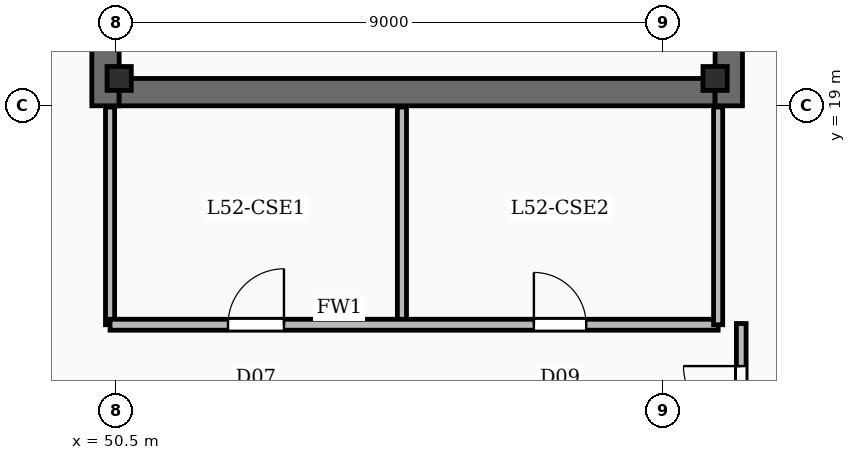
"""IFC4 building model, lengths in metres.
Left out: names, types, materials, properties, quantities, classifications, styles, units other than length and angle.
Written with IfcOpenShell. Run it as: python <this file> out.ifc"""

import sys

from ifc_helpers import new_model, si_unit, direction, frame, frame_2d, origin, origin_2d, place, context, subcontext, project, spatial, rectangle, i_section, extrude, element, fill, save


model = new_model("IFC4")
c1 = context("Model", 3, precision=1e-05, world=origin(), true_north=direction((0.0, 1.0)))
c2 = subcontext(c1, "Body", "Model", "MODEL_VIEW")
j1 = project(units=[si_unit("LENGTHUNIT", "METRE"), si_unit("PLANEANGLEUNIT", "RADIAN")], contexts=[c1])
p1 = place(None, origin())
s1 = spatial("IfcSite", under=j1, at=p1, CompositionType="ELEMENT")
p2 = place(p1, origin())
s2 = spatial("IfcBuilding", under=s1, at=p2, CompositionType="ELEMENT")
p3 = place(p2, frame((0.0, 0.0, 216.15)))
s3 = spatial("IfcBuildingStorey", under=s2, at=p3, CompositionType="ELEMENT", Elevation=216.15)
p4 = place(p3, frame((50.325, 19.0, -0.45), z_axis=(0.0, 0.0, 1.0), x_axis=(0.0, 1.0, 0.0)))
e1 = element("IfcWall", 1, at=p4, inside=s3, PredefinedType="SHEAR", context=c2, shape_type="SweptSolid", body=[
    extrude(rectangle(XDim=20.8, YDim=0.45, at=frame_2d((10.4, 0.0))), origin(), (0.0, 0.0, 1.0), 4.98),
])
p5 = place(p4, frame((2.5, 0.0, 0.45)))
e2 = element("IfcOpeningElement", 2, at=p5, cuts=e1, PredefinedType="OPENING", context=c2, shape_type="SweptSolid", body=[
    extrude(rectangle(XDim=1.05, YDim=2.15, at=frame_2d((0.525, 1.075))), frame((0.0, 0.235, 0.0), z_axis=(0.0, -1.0, 0.0), x_axis=(1.0, 0.0, 0.0)), (0.0, 0.0, 1.0), 0.47),
])
p6 = place(p4, frame((8.65, 0.0, 0.45)))
e3 = element("IfcOpeningElement", 3, at=p6, cuts=e1, PredefinedType="OPENING", context=c2, shape_type="SweptSolid", body=[
    extrude(rectangle(XDim=1.05, YDim=2.15, at=frame_2d((0.525, 1.075))), frame((0.0, 0.235, 0.0), z_axis=(0.0, -1.0, 0.0), x_axis=(1.0, 0.0, 0.0)), (0.0, 0.0, 1.0), 0.47),
])
p7 = place(p4, frame((14.62, 0.0, 0.45)))
e4 = element("IfcOpeningElement", 4, at=p7, cuts=e1, PredefinedType="OPENING", context=c2, shape_type="SweptSolid", body=[
    extrude(rectangle(XDim=1.1, YDim=2.15, at=frame_2d((0.55, 1.075))), frame((0.0, 0.235, 0.0), z_axis=(0.0, -1.0, 0.0), x_axis=(1.0, 0.0, 0.0)), (0.0, 0.0, 1.0), 0.47),
])
p8 = place(p3, frame((60.575, 19.0, -0.45), z_axis=(0.0, 0.0, 1.0), x_axis=(0.0, 1.0, 0.0)))
e5 = element("IfcWall", 5, at=p8, inside=s3, PredefinedType="SHEAR", context=c2, shape_type="SweptSolid", body=[
    extrude(rectangle(XDim=20.8, YDim=0.45, at=frame_2d((10.4, 0.0))), origin(), (0.0, 0.0, 1.0), 4.98),
])
p9 = place(p3, frame((50.55, 19.225, -0.45), z_axis=(0.0, 0.0, 1.0), x_axis=(1.0, 0.0, 0.0)))
e6 = element("IfcWall", 6, at=p9, inside=s3, PredefinedType="SHEAR", context=c2, shape_type="SweptSolid", body=[
    extrude(rectangle(XDim=9.8, YDim=0.45, at=frame_2d((4.9, 0.0))), origin(), (0.0, 0.0, 1.0), 4.98),
])
for number, where, z_axis, x_axis in (
    (7, (50.55, 19.45, -0.45), (0.0, 0.0, 1.0), (1.0, 0.0, 0.0)),
    (8, (60.35, 19.45, -0.45), (0.0, 0.0, 1.0), (1.0, 0.0, 0.0)),
):
    element("IfcColumn", number, at=place(p3, frame(where, z_axis=z_axis, x_axis=x_axis)), inside=s3, PredefinedType="COLUMN", context=c2, shape_type="SweptSolid", body=[
        extrude(i_section(OverallWidth=0.399, OverallDepth=0.393, WebThickness=0.023, FlangeThickness=0.037, FilletRadius=0.02, at=origin_2d()), origin(), (0.0, 0.0, 1.0), 4.98),
    ])
p10 = place(p3, frame((55.2, 15.4, 0.0), z_axis=(0.0, 0.0, 1.0), x_axis=(0.0, 1.0, 0.0)))
e9 = element("IfcWall", 9, at=p10, inside=s3, PredefinedType="PARTITIONING", context=c2, shape_type="SweptSolid", body=[
    extrude(rectangle(XDim=3.58, YDim=0.15, at=frame_2d((1.79, 0.0))), origin(), (0.0, 0.0, 1.0), 3.59),
])
p11 = place(p3, frame((50.4, 15.4, 0.0), z_axis=(0.0, 0.0, 1.0), x_axis=(1.0, 0.0, 0.0)))
e10 = element("IfcWall", 10, at=p11, inside=s3, PredefinedType="SOLIDWALL", context=c2, shape_type="SweptSolid", body=[
    extrude(rectangle(XDim=10.0, YDim=0.18, at=frame_2d((5.0, 0.0))), origin(), (0.0, 0.0, 1.0), 3.59),
])
p12 = place(p11, frame((1.94, 0.0, 0.0)))
e11 = element("IfcOpeningElement", 11, at=p12, cuts=e10, PredefinedType="OPENING", context=c2, shape_type="SweptSolid", body=[
    extrude(rectangle(XDim=0.92, YDim=2.1, at=frame_2d((0.46, 1.05))), frame((0.0, 0.1, 0.0), z_axis=(0.0, -1.0, 0.0), x_axis=(1.0, 0.0, 0.0)), (0.0, 0.0, 1.0), 0.2),
])
p13 = place(p11, frame((6.97, 0.0, 0.0)))
e12 = element("IfcOpeningElement", 12, at=p13, cuts=e10, PredefinedType="OPENING", context=c2, shape_type="SweptSolid", body=[
    extrude(rectangle(XDim=0.86, YDim=2.05, at=frame_2d((0.43, 1.025))), frame((0.0, 0.1, 0.0), z_axis=(0.0, -1.0, 0.0), x_axis=(1.0, 0.0, 0.0)), (0.0, 0.0, 1.0), 0.2),
])
for number, where, z_axis, x_axis in (
    (13, (50.4, 15.4, 0.0), (0.0, 0.0, 1.0), (0.0, 1.0, 0.0)),
    (14, (60.4, 15.4, 0.0), (0.0, 0.0, 1.0), (0.0, 1.0, 0.0)),
):
    element("IfcWall", number, at=place(p3, frame(where, z_axis=z_axis, x_axis=x_axis)), inside=s3, PredefinedType="PARTITIONING", context=c2, shape_type="SweptSolid", body=[
        extrude(rectangle(XDim=3.58, YDim=0.15, at=frame_2d((1.79, 0.0))), origin(), (0.0, 0.0, 1.0), 3.59),
    ])
p14 = place(p3, frame((60.78, 13.12, 0.0), z_axis=(0.0, 0.0, 1.0), x_axis=(0.0, 1.0, 0.0)))
e15 = element("IfcWall", 15, at=p14, inside=s3, PredefinedType="PARTITIONING", context=c2, shape_type="SweptSolid", body=[
    extrude(rectangle(XDim=2.3, YDim=0.16, at=frame_2d((1.15, 0.0))), origin(), (0.0, 0.0, 1.0), 3.59),
])
p15 = place(p14, frame((0.65, 0.0, 0.0)))
e16 = element("IfcOpeningElement", 16, at=p15, cuts=e15, PredefinedType="OPENING", context=c2, shape_type="SweptSolid", body=[
    extrude(rectangle(XDim=0.95, YDim=2.15, at=frame_2d((0.475, 1.075))), frame((0.0, 0.09, 0.0), z_axis=(0.0, -1.0, 0.0), x_axis=(1.0, 0.0, 0.0)), (0.0, 0.0, 1.0), 0.18),
])
p16 = place(p12, origin())
e17 = element("IfcDoor", 17, at=p16, inside=s3, OperationType="SINGLE_SWING_RIGHT", PredefinedType="DOOR", context=c2, shape_type="SweptSolid", body=[
    extrude(rectangle(XDim=0.92, YDim=2.1, at=frame_2d((0.46, 1.05))), frame((0.0, 0.025, 0.0), z_axis=(0.0, -1.0, 0.0), x_axis=(1.0, 0.0, 0.0)), (0.0, 0.0, 1.0), 0.05),
])
fill(e11, e17)
p17 = place(p13, origin())
e18 = element("IfcDoor", 18, at=p17, inside=s3, OperationType="SINGLE_SWING_LEFT", PredefinedType="DOOR", context=c2, shape_type="SweptSolid", body=[
    extrude(rectangle(XDim=0.86, YDim=2.05, at=frame_2d((0.43, 1.025))), frame((0.0, 0.025, 0.0), z_axis=(0.0, -1.0, 0.0), x_axis=(1.0, 0.0, 0.0)), (0.0, 0.0, 1.0), 0.05),
])
fill(e12, e18)
p18 = place(p15, origin())
e19 = element("IfcDoor", 19, at=p18, inside=s3, OperationType="SINGLE_SWING_RIGHT", PredefinedType="DOOR", context=c2, shape_type="SweptSolid", body=[
    extrude(rectangle(XDim=0.95, YDim=2.15, at=frame_2d((0.475, 1.075))), frame((0.0, 0.025, 0.0), z_axis=(0.0, -1.0, 0.0), x_axis=(1.0, 0.0, 0.0)), (0.0, 0.0, 1.0), 0.05),
])
fill(e16, e19)
save(model, sys.argv[1])
